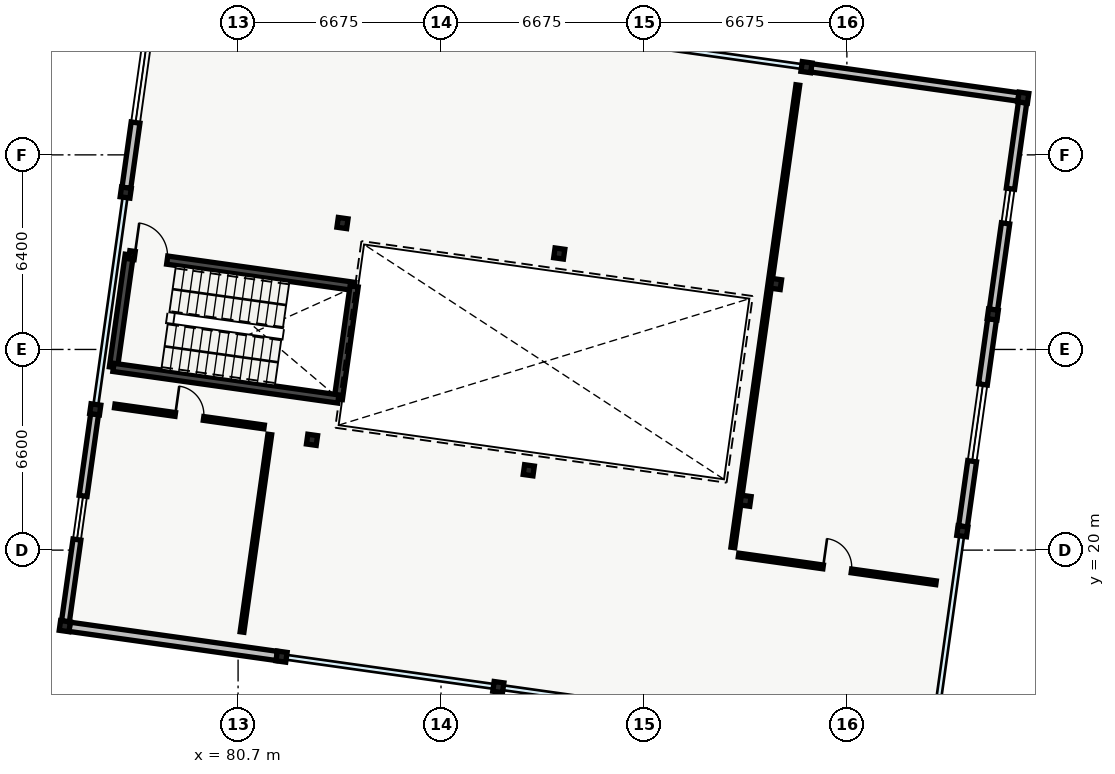
"""IFC4 building model, lengths in metres.
Left out: names, types, materials, properties, quantities, classifications, styles, units other than length and angle.
Written with IfcOpenShell. Run it as: python <this file> out.ifc"""

import sys

from ifc_helpers import new_model, si_unit, direction, frame, frame_2d, origin, origin_2d, place, context, subcontext, project, spatial, rectangle, hollow_circle, extrude, element, fill, save


model = new_model("IFC4")
c1 = context("Model", 3, precision=1e-05, world=origin(), true_north=direction((0.0, 1.0)))
c2 = subcontext(c1, "Body", "Model", "MODEL_VIEW")
j1 = project(units=[si_unit("LENGTHUNIT", "METRE"), si_unit("PLANEANGLEUNIT", "RADIAN")], contexts=[c1])
p1 = place(None, origin())
s1 = spatial("IfcSite", under=j1, at=p1, CompositionType="ELEMENT")
p2 = place(p1, origin())
s2 = spatial("IfcBuilding", under=s1, at=p2, CompositionType="ELEMENT")
p3 = place(p2, frame((0.0, 0.0, 5.1)))
s3 = spatial("IfcBuildingStorey", under=s2, at=p3, CompositionType="ELEMENT", Elevation=5.1)
for number, where, z_axis, x_axis in (
    (1, (75.0, 17.5, 0.0), (0.0, 0.0, 1.0), (0.99, -0.139, 0.0)),
    (2, (76.002, 24.63, 0.0), (0.0, 0.0, 1.0), (0.99, -0.139, 0.0)),
    (3, (77.004, 31.76, 0.0), (0.0, 0.0, 1.0), (0.99, -0.139, 0.0)),
    (4, (82.13, 16.498, 0.0), (0.0, 0.0, 1.0), (0.99, -0.139, 0.0)),
    (5, (83.132, 23.628, 0.0), (0.0, 0.0, 1.0), (0.99, -0.139, 0.0)),
    (6, (84.134, 30.758, 0.0), (0.0, 0.0, 1.0), (0.99, -0.139, 0.0)),
    (7, (89.26, 15.496, 0.0), (0.0, 0.0, 1.0), (0.99, -0.139, 0.0)),
    (8, (90.262, 22.626, 0.0), (0.0, 0.0, 1.0), (0.99, -0.139, 0.0)),
    (9, (91.264, 29.756, 0.0), (0.0, 0.0, 1.0), (0.99, -0.139, 0.0)),
    (10, (97.392, 21.624, 0.0), (0.0, 0.0, 1.0), (0.99, -0.139, 0.0)),
    (11, (98.394, 28.754, 0.0), (0.0, 0.0, 1.0), (0.99, -0.139, 0.0)),
    (12, (99.396, 35.884, 0.0), (0.0, 0.0, 1.0), (0.99, -0.139, 0.0)),
    (13, (104.522, 20.622, 0.0), (0.0, 0.0, 1.0), (0.99, -0.139, 0.0)),
    (14, (105.524, 27.752, 0.0), (0.0, 0.0, 1.0), (0.99, -0.139, 0.0)),
    (15, (106.526, 34.882, 0.0), (0.0, 0.0, 1.0), (0.99, -0.139, 0.0)),
):
    element("IfcColumn", number, at=place(p3, frame(where, z_axis=z_axis, x_axis=x_axis)), inside=s3, PredefinedType="COLUMN", context=c2, shape_type="SweptSolid", body=[
        extrude(hollow_circle(Radius=0.162, WallThickness=0.012, at=origin_2d()), origin(), (0.0, 0.0, 1.0), 4.31),
    ])
p4 = place(p3, frame((75.022, 17.656, 0.0), z_axis=(0.0, 0.0, 1.0), x_axis=(0.139197247179, 0.990264674912, 0.0)))
e16 = element("IfcWall", 16, at=p4, inside=s3, PredefinedType="STANDARD", context=c2, shape_type="SweptSolid", body=[
    extrude(rectangle(XDim=6.886, YDim=0.26, at=frame_2d((3.443, 0.0))), origin(), (0.0, 0.0, 1.0), 4.045),
])
p5 = place(p4, frame((2.718, 0.0, 0.95)))
e17 = element("IfcOpeningElement", 17, at=p5, cuts=e16, PredefinedType="OPENING", context=c2, shape_type="SweptSolid", body=[
    extrude(rectangle(XDim=1.45, YDim=1.35, at=frame_2d((0.725, 0.675))), frame((0.0, 0.13, 0.0), z_axis=(0.0, -1.0, 0.0), x_axis=(1.0, 0.0, 0.0)), (0.0, 0.0, 1.0), 0.26),
])
p6 = place(p3, frame((77.026, 31.915, 0.0), z_axis=(0.0, 0.0, 1.0), x_axis=(0.139192360124, 0.990265361852, 0.0)))
e18 = element("IfcWall", 18, at=p6, inside=s3, PredefinedType="STANDARD", context=c2, shape_type="SweptSolid", body=[
    extrude(rectangle(XDim=6.886, YDim=0.29, at=frame_2d((3.443, 0.0))), origin(), (0.0, 0.0, 1.0), 4.045),
])
p7 = place(p6, frame((2.168, 0.0, 0.95)))
e19 = element("IfcOpeningElement", 19, at=p7, cuts=e18, PredefinedType="OPENING", context=c2, shape_type="SweptSolid", body=[
    extrude(rectangle(XDim=2.55, YDim=1.75, at=frame_2d((1.275, 0.875))), frame((0.0, 0.145, 0.0), z_axis=(0.0, -1.0, 0.0), x_axis=(1.0, 0.0, 0.0)), (0.0, 0.0, 1.0), 0.29),
])
p8 = place(p3, frame((99.552, 35.862, 0.0), z_axis=(0.0, 0.0, 1.0), x_axis=(0.99026956155, -0.139162478664, 0.0)))
e20 = element("IfcWall", 20, at=p8, inside=s3, PredefinedType="STANDARD", context=c2, shape_type="SweptSolid", body=[
    extrude(rectangle(XDim=6.886, YDim=0.275, at=frame_2d((3.443, 0.0))), origin(), (0.0, 0.0, 1.0), 4.045),
])
p9 = place(p3, frame((106.504, 34.726, 0.0), z_axis=(0.0, 0.0, 1.0), x_axis=(-0.139162478664, -0.99026956155, 0.0)))
e21 = element("IfcWall", 21, at=p9, inside=s3, PredefinedType="STANDARD", context=c2, shape_type="SweptSolid", body=[
    extrude(rectangle(XDim=6.886, YDim=0.275, at=frame_2d((3.443, 0.0))), origin(), (0.0, 0.0, 1.0), 4.045),
])
p10 = place(p9, frame((2.868, 0.0, 0.95)))
e22 = element("IfcOpeningElement", 22, at=p10, cuts=e21, PredefinedType="OPENING", context=c2, shape_type="SweptSolid", body=[
    extrude(rectangle(XDim=1.15, YDim=1.6, at=frame_2d((0.575, 0.8))), frame((0.0, 0.137, 0.0), z_axis=(0.0, -1.0, 0.0), x_axis=(1.0, 0.0, 0.0)), (0.0, 0.0, 1.0), 0.275),
])
p11 = place(p3, frame((105.502, 27.596, 0.0), z_axis=(0.0, 0.0, 1.0), x_axis=(-0.139157592782, -0.99027024815, 0.0)))
e23 = element("IfcWall", 23, at=p11, inside=s3, PredefinedType="STANDARD", context=c2, shape_type="SweptSolid", body=[
    extrude(rectangle(XDim=6.886, YDim=0.29, at=frame_2d((3.443, 0.0))), origin(), (0.0, 0.0, 1.0), 4.045),
])
p12 = place(p11, frame((2.168, 0.0, 0.95)))
e24 = element("IfcOpeningElement", 24, at=p12, cuts=e23, PredefinedType="OPENING", context=c2, shape_type="SweptSolid", body=[
    extrude(rectangle(XDim=2.55, YDim=1.75, at=frame_2d((1.275, 0.875))), frame((0.0, 0.145, 0.0), z_axis=(0.0, -1.0, 0.0), x_axis=(1.0, 0.0, 0.0)), (0.0, 0.0, 1.0), 0.29),
])
p13 = place(p3, frame((81.974, 16.52, 0.0), z_axis=(0.0, 0.0, 1.0), x_axis=(-0.990264674912, 0.139197247179, 0.0)))
e25 = element("IfcWall", 25, at=p13, inside=s3, PredefinedType="STANDARD", context=c2, shape_type="SweptSolid", body=[
    extrude(rectangle(XDim=6.886, YDim=0.305, at=frame_2d((3.443, 0.0))), origin(), (0.0, 0.0, 1.0), 4.045),
])
p14 = place(p3, frame((76.6, 26.01, 0.0), z_axis=(0.0, 0.0, 1.0), x_axis=(0.139172815303, 0.990268108888, 0.0)))
e26 = element("IfcWall", 26, at=p14, inside=s3, PredefinedType="SHEAR", context=c2, shape_type="SweptSolid", body=[
    extrude(rectangle(XDim=3.74, YDim=0.27, at=frame_2d((1.87, 0.0))), origin(), (0.0, 0.0, 1.0), 4.28),
])
p15 = place(p3, frame((77.12, 29.714, 0.0), z_axis=(0.0, 0.0, 1.0), x_axis=(0.990265308789, -0.139192737628, 0.0)))
e27 = element("IfcWall", 27, at=p15, inside=s3, PredefinedType="SHEAR", context=c2, shape_type="SweptSolid", body=[
    extrude(rectangle(XDim=7.47, YDim=0.27, at=frame_2d((3.735, 0.0))), origin(), (0.0, 0.0, 1.0), 4.28),
])
p16 = place(p15, frame((0.18, 0.0, 0.0)))
e28 = element("IfcOpeningElement", 28, at=p16, cuts=e27, PredefinedType="OPENING", context=c2, shape_type="SweptSolid", body=[
    extrude(rectangle(XDim=1.08, YDim=2.15, at=frame_2d((0.54, 1.075))), frame((0.0, 0.135, 0.0), z_axis=(0.0, -1.0, 0.0), x_axis=(1.0, 0.0, 0.0)), (0.0, 0.0, 1.0), 0.27),
])
p17 = place(p3, frame((84.518, 28.674, 0.0), z_axis=(0.0, 0.0, 1.0), x_axis=(-0.139172815303, -0.990268108888, 0.0)))
e29 = element("IfcWall", 29, at=p17, inside=s3, PredefinedType="SHEAR", context=c2, shape_type="SweptSolid", body=[
    extrude(rectangle(XDim=3.74, YDim=0.27, at=frame_2d((1.87, 0.0))), origin(), (0.0, 0.0, 1.0), 4.28),
])
p18 = place(p3, frame((83.997, 24.97, 0.0), z_axis=(0.0, 0.0, 1.0), x_axis=(-0.990265308789, 0.139192737628, 0.0)))
e30 = element("IfcWall", 30, at=p18, inside=s3, PredefinedType="SHEAR", context=c2, shape_type="SweptSolid", body=[
    extrude(rectangle(XDim=7.47, YDim=0.27, at=frame_2d((3.735, 0.0))), origin(), (0.0, 0.0, 1.0), 4.28),
])
p19 = place(p3, frame((80.83, 17.307, 0.0), z_axis=(0.0, 0.0, 1.0), x_axis=(0.139185834999, 0.990266279006, 0.0)))
e31 = element("IfcWall", 31, at=p19, inside=s3, PredefinedType="PARTITIONING", context=c2, shape_type="SweptSolid", body=[
    extrude(rectangle(XDim=6.56, YDim=0.125, at=frame_2d((3.28, 0.0))), origin(), (0.0, 0.0, 1.0), 3.95),
])
p20 = place(p3, frame((81.556, 24.052, 0.0), z_axis=(0.0, 0.0, 1.0), x_axis=(-0.990271738652, 0.139146985694, 0.0)))
e32 = element("IfcWall", 32, at=p20, inside=s3, PredefinedType="PARTITIONING", context=c2, shape_type="SweptSolid", body=[
    extrude(rectangle(XDim=4.96, YDim=0.125, at=frame_2d((2.48, 0.0))), origin(), (0.0, 0.0, 1.0), 3.95),
])
p21 = place(p20, frame((2.01, 0.0, 0.0)))
e33 = element("IfcOpeningElement", 33, at=p21, cuts=e32, PredefinedType="OPENING", context=c2, shape_type="SweptSolid", body=[
    extrude(rectangle(XDim=0.94, YDim=2.12, at=frame_2d((0.47, 1.06))), frame((0.0, 0.062, 0.0), z_axis=(0.0, -1.0, 0.0), x_axis=(1.0, 0.0, 0.0)), (0.0, 0.0, 1.0), 0.125),
])
p22 = place(p3, frame((97.161, 19.839, 0.0), z_axis=(0.0, 0.0, 1.0), x_axis=(0.990265558002, -0.139190964632, 0.0)))
e34 = element("IfcWall", 34, at=p22, inside=s3, PredefinedType="PARTITIONING", context=c2, shape_type="SweptSolid", body=[
    extrude(rectangle(XDim=6.56, YDim=0.125, at=frame_2d((3.28, 0.0))), origin(), (0.0, 0.0, 1.0), 3.95),
])
p23 = place(p22, frame((2.81, 0.0, 0.0)))
e35 = element("IfcOpeningElement", 35, at=p23, cuts=e34, PredefinedType="OPENING", context=c2, shape_type="SweptSolid", body=[
    extrude(rectangle(XDim=0.94, YDim=2.12, at=frame_2d((0.47, 1.06))), frame((0.0, 0.062, 0.0), z_axis=(0.0, -1.0, 0.0), x_axis=(1.0, 0.0, 0.0)), (0.0, 0.0, 1.0), 0.125),
])
p24 = place(p3, frame((99.112, 35.298, 0.0), z_axis=(0.0, 0.0, 1.0), x_axis=(-0.139171298776, -0.99026832202, 0.0)))
e36 = element("IfcWall", 36, at=p24, inside=s3, PredefinedType="PARTITIONING", context=c2, shape_type="SweptSolid", body=[
    extrude(rectangle(XDim=15.36, YDim=0.125, at=frame_2d((7.68, 0.0))), origin(), (0.0, 0.0, 1.0), 3.95),
])
p25 = place(p5, origin())
e37 = element("IfcWindow", 37, at=p25, inside=s3, PartitioningType="SINGLE_PANEL", PredefinedType="WINDOW", context=c2, shape_type="SweptSolid", body=[
    extrude(rectangle(XDim=1.45, YDim=1.35, at=frame_2d((0.725, 0.675))), frame((0.0, 0.03, 0.0), z_axis=(0.0, -1.0, 0.0), x_axis=(1.0, 0.0, 0.0)), (0.0, 0.0, 1.0), 0.06),
])
fill(e17, e37)
p26 = place(p7, origin())
e38 = element("IfcWindow", 38, at=p26, inside=s3, PartitioningType="SINGLE_PANEL", PredefinedType="WINDOW", context=c2, shape_type="SweptSolid", body=[
    extrude(rectangle(XDim=2.55, YDim=1.75, at=frame_2d((1.275, 0.875))), frame((0.0, 0.03, 0.0), z_axis=(0.0, -1.0, 0.0), x_axis=(1.0, 0.0, 0.0)), (0.0, 0.0, 1.0), 0.06),
])
fill(e19, e38)
p27 = place(p10, origin())
e39 = element("IfcWindow", 39, at=p27, inside=s3, PartitioningType="SINGLE_PANEL", PredefinedType="WINDOW", context=c2, shape_type="SweptSolid", body=[
    extrude(rectangle(XDim=1.15, YDim=1.6, at=frame_2d((0.575, 0.8))), frame((0.0, 0.03, 0.0), z_axis=(0.0, -1.0, 0.0), x_axis=(1.0, 0.0, 0.0)), (0.0, 0.0, 1.0), 0.06),
])
fill(e22, e39)
p28 = place(p12, origin())
e40 = element("IfcWindow", 40, at=p28, inside=s3, PartitioningType="SINGLE_PANEL", PredefinedType="WINDOW", context=c2, shape_type="SweptSolid", body=[
    extrude(rectangle(XDim=2.55, YDim=1.75, at=frame_2d((1.275, 0.875))), frame((0.0, 0.03, 0.0), z_axis=(0.0, -1.0, 0.0), x_axis=(1.0, 0.0, 0.0)), (0.0, 0.0, 1.0), 0.06),
])
fill(e24, e40)
p29 = place(p16, origin())
e41 = element("IfcDoor", 41, at=p29, inside=s3, OperationType="SINGLE_SWING_LEFT", PredefinedType="DOOR", context=c2, shape_type="SweptSolid", body=[
    extrude(rectangle(XDim=1.08, YDim=2.15, at=frame_2d((0.54, 1.075))), frame((0.0, 0.025, 0.0), z_axis=(0.0, -1.0, 0.0), x_axis=(1.0, 0.0, 0.0)), (0.0, 0.0, 1.0), 0.05),
])
fill(e28, e41)
p30 = place(p21, origin())
e42 = element("IfcDoor", 42, at=p30, inside=s3, OperationType="SINGLE_SWING_RIGHT", PredefinedType="DOOR", context=c2, shape_type="SweptSolid", body=[
    extrude(rectangle(XDim=0.94, YDim=2.12, at=frame_2d((0.47, 1.06))), frame((0.0, 0.025, 0.0), z_axis=(0.0, -1.0, 0.0), x_axis=(1.0, 0.0, 0.0)), (0.0, 0.0, 1.0), 0.05),
])
fill(e33, e42)
p31 = place(p23, origin())
e43 = element("IfcDoor", 43, at=p31, inside=s3, OperationType="SINGLE_SWING_LEFT", PredefinedType="DOOR", context=c2, shape_type="SweptSolid", body=[
    extrude(rectangle(XDim=0.94, YDim=2.12, at=frame_2d((0.47, 1.06))), frame((0.0, 0.025, 0.0), z_axis=(0.0, -1.0, 0.0), x_axis=(1.0, 0.0, 0.0)), (0.0, 0.0, 1.0), 0.05),
])
fill(e35, e43)
save(model, sys.argv[1])
